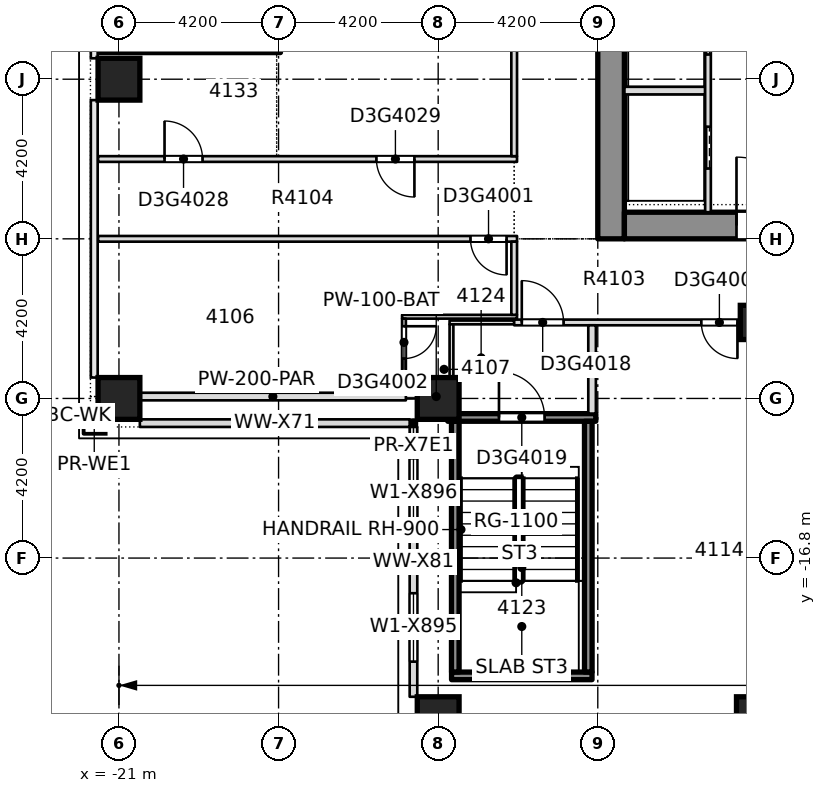
"""IFC4 building model, lengths in metres.
Left out: names, types, materials, properties, quantities, classifications, styles, units other than length and angle.
Written with IfcOpenShell. Run it as: python <this file> out.ifc"""

import sys

from ifc_helpers import new_model, si_unit, direction, frame, frame_2d, origin, origin_2d, place, context, subcontext, project, spatial, rectangle, extrude, element, fill, save


model = new_model("IFC4")
c1 = context("Model", 3, precision=1e-05, world=origin(), true_north=direction((0.0, 1.0)))
c2 = subcontext(c1, "Body", "Model", "MODEL_VIEW")
j1 = project(units=[si_unit("LENGTHUNIT", "METRE"), si_unit("PLANEANGLEUNIT", "RADIAN")], contexts=[c1])
p1 = place(None, origin())
s1 = spatial("IfcSite", under=j1, at=p1, CompositionType="ELEMENT")
p2 = place(p1, origin())
s2 = spatial("IfcBuilding", under=s1, at=p2, CompositionType="ELEMENT")
p3 = place(p2, frame((0.0, 0.0, 160.7)))
s3 = spatial("IfcBuildingStorey", under=s2, at=p3, CompositionType="ELEMENT", Elevation=160.7)
p4 = place(p3, frame((-8.05, -8.4, -0.4), z_axis=(0.0, 0.0, 1.0), x_axis=(0.0, 1.0, 0.0)))
e1 = element("IfcWall", 1, at=p4, inside=s3, PredefinedType="SOLIDWALL", context=c2, shape_type="SweptSolid", body=[
    extrude(rectangle(XDim=30.15, YDim=0.7, at=frame_2d((15.075, 0.0))), origin(), (0.0, 0.0, 1.0), 3.45),
])
p5 = place(p4, frame((19.3, 0.0, 0.4)))
e2 = element("IfcOpeningElement", 2, at=p5, cuts=e1, PredefinedType="OPENING", context=c2, shape_type="SweptSolid", body=[
    extrude(rectangle(XDim=1.2, YDim=2.1, at=frame_2d((0.6, 1.05))), frame((0.0, 0.36, 0.0), z_axis=(0.0, -1.0, 0.0), x_axis=(1.0, 0.0, 0.0)), (0.0, 0.0, 1.0), 0.72),
])
p6 = place(p3, frame((-7.7, -8.05, -0.4), z_axis=(0.0, 0.0, 1.0), x_axis=(1.0, 0.0, 0.0)))
e3 = element("IfcWall", 3, at=p6, inside=s3, PredefinedType="SHEAR", context=c2, shape_type="SweptSolid", body=[
    extrude(rectangle(XDim=15.4, YDim=0.7, at=frame_2d((7.7, 0.0))), origin(), (0.0, 0.0, 1.0), 3.45),
])
p7 = place(p6, frame((2.95, 0.0, 0.4)))
e4 = element("IfcOpeningElement", 4, at=p7, cuts=e3, PredefinedType="OPENING", context=c2, shape_type="SweptSolid", body=[
    extrude(rectangle(XDim=1.8, YDim=2.1, at=frame_2d((0.9, 1.05))), frame((0.0, 0.36, 0.0), z_axis=(0.0, -1.0, 0.0), x_axis=(1.0, 0.0, 0.0)), (0.0, 0.0, 1.0), 0.72),
])
p8 = place(p6, frame((10.65, 0.0, 0.4)))
e5 = element("IfcOpeningElement", 5, at=p8, cuts=e3, PredefinedType="OPENING", context=c2, shape_type="SweptSolid", body=[
    extrude(rectangle(XDim=1.8, YDim=2.1, at=frame_2d((0.9, 1.05))), frame((0.0, 0.36, 0.0), z_axis=(0.0, -1.0, 0.0), x_axis=(1.0, 0.0, 0.0)), (0.0, 0.0, 1.0), 0.72),
])
for number, where, z_axis, x_axis in (
    (6, (-12.6, -21.0, -0.4), (0.0, 0.0, 1.0), (1.0, 0.0, 0.0)),
    (7, (-4.2, -21.0, -0.4), (0.0, 0.0, 1.0), (1.0, 0.0, 0.0)),
    (8, (-21.0, -12.6, -0.4), (0.0, 0.0, 1.0), (1.0, 0.0, 0.0)),
    (9, (-12.6, -12.6, -0.4), (0.0, 0.0, 1.0), (1.0, 0.0, 0.0)),
    (10, (-21.0, -4.2, -0.4), (0.0, 0.0, 1.0), (1.0, 0.0, 0.0)),
):
    element("IfcColumn", number, at=place(p3, frame(where, z_axis=z_axis, x_axis=x_axis)), inside=s3, PredefinedType="COLUMN", context=c2, shape_type="SweptSolid", body=[
        extrude(rectangle(XDim=1.1, YDim=1.1, at=origin_2d()), origin(), (0.0, 0.0, 1.0), 3.45),
    ])
p9 = place(p3, frame((-4.2, -10.6, -0.4), z_axis=(0.0, 0.0, 1.0), x_axis=(1.0, 0.0, 0.0)))
e11 = element("IfcColumn", 11, at=p9, inside=s3, PredefinedType="COLUMN", context=c2, shape_type="SweptSolid", body=[
    extrude(rectangle(XDim=0.9, YDim=0.9, at=origin_2d()), origin(), (0.0, 0.0, 1.0), 3.45),
])
p10 = place(p3, frame((-12.248, -19.9, 0.0), z_axis=(0.0, 0.0, 1.0), x_axis=(1.0, 0.0, 0.0)))
e12 = element("IfcWall", 12, at=p10, inside=s3, PredefinedType="SOLIDWALL", context=c2, shape_type="SweptSolid", body=[
    extrude(rectangle(XDim=3.696, YDim=0.2, at=frame_2d((1.848, 0.0))), origin(), (0.0, 0.0, 1.0), 3.05),
])
p11 = place(p3, frame((-12.348, -13.1, 0.0), z_axis=(0.0, 0.0, 1.0), x_axis=(1.0, 0.0, 0.0)))
e13 = element("IfcWall", 13, at=p11, inside=s3, PredefinedType="SOLIDWALL", context=c2, shape_type="SweptSolid", body=[
    extrude(rectangle(XDim=3.896, YDim=0.2, at=frame_2d((1.948, 0.0))), origin(), (0.0, 0.0, 1.0), 3.05),
])
p12 = place(p11, frame((1.348, 0.0, 0.0)))
e14 = element("IfcOpeningElement", 14, at=p12, cuts=e13, PredefinedType="OPENING", context=c2, shape_type="SweptSolid", body=[
    extrude(rectangle(XDim=1.2, YDim=2.1, at=frame_2d((0.6, 1.05))), frame((0.0, 0.11, 0.0), z_axis=(0.0, -1.0, 0.0), x_axis=(1.0, 0.0, 0.0)), (0.0, 0.0, 1.0), 0.22),
])
p13 = place(p3, frame((-21.55, -12.55, 0.0), z_axis=(0.0, 0.0, 1.0), x_axis=(1.0, 0.0, 0.0)))
e15 = element("IfcWall", 15, at=p13, inside=s3, PredefinedType="PARTITIONING", context=c2, shape_type="SweptSolid", body=[
    extrude(rectangle(XDim=1.1, YDim=0.2, at=frame_2d((0.55, 0.0))), origin(), (0.0, 0.0, 1.0), 3.05),
])
p14 = place(p3, frame((-13.55, -12.55, 0.0), z_axis=(0.0, 0.0, 1.0), x_axis=(1.0, 0.0, 0.0)))
e16 = element("IfcWall", 16, at=p14, inside=s3, PredefinedType="PARTITIONING", context=c2, shape_type="SweptSolid", body=[
    extrude(rectangle(XDim=0.4, YDim=0.1, at=frame_2d((0.2, 0.0))), origin(), (0.0, 0.0, 1.0), 2.5),
])
p15 = place(p3, frame((-12.3, -10.6, 0.0), z_axis=(0.0, 0.0, 1.0), x_axis=(1.0, 0.0, 0.0)))
e17 = element("IfcWall", 17, at=p15, inside=s3, PredefinedType="PARTITIONING", context=c2, shape_type="SweptSolid", body=[
    extrude(rectangle(XDim=1.7, YDim=0.1, at=frame_2d((0.85, 0.0))), origin(), (0.0, 0.0, 1.0), 3.05),
])
p16 = place(p3, frame((-10.6, -10.6, 0.0), z_axis=(0.0, 0.0, 1.0), x_axis=(1.0, 0.0, 0.0)))
e18 = element("IfcWall", 18, at=p16, inside=s3, PredefinedType="PARTITIONING", context=c2, shape_type="SweptSolid", body=[
    extrude(rectangle(XDim=21.25, YDim=0.15, at=frame_2d((10.625, 0.0))), origin(), (0.0, 0.0, 1.0), 3.05),
])
p17 = place(p16, frame((4.925, 0.0, 0.0)))
e19 = element("IfcOpeningElement", 19, at=p17, cuts=e18, PredefinedType="OPENING", context=c2, shape_type="SweptSolid", body=[
    extrude(rectangle(XDim=0.95, YDim=2.1, at=frame_2d((0.475, 1.05))), frame((0.0, 0.085, 0.0), z_axis=(0.0, -1.0, 0.0), x_axis=(1.0, 0.0, 0.0)), (0.0, 0.0, 1.0), 0.17),
])
p18 = place(p16, frame((15.325, 0.0, 0.0)))
e20 = element("IfcOpeningElement", 20, at=p18, cuts=e18, PredefinedType="OPENING", context=c2, shape_type="SweptSolid", body=[
    extrude(rectangle(XDim=0.95, YDim=2.1, at=frame_2d((0.475, 1.05))), frame((0.0, 0.085, 0.0), z_axis=(0.0, -1.0, 0.0), x_axis=(1.0, 0.0, 0.0)), (0.0, 0.0, 1.0), 0.17),
])
p19 = place(p16, frame((0.2, 0.0, 0.0)))
e21 = element("IfcOpeningElement", 21, at=p19, cuts=e18, PredefinedType="OPENING", context=c2, shape_type="SweptSolid", body=[
    extrude(rectangle(XDim=1.1, YDim=2.1, at=frame_2d((0.55, 1.05))), frame((0.0, 0.085, 0.0), z_axis=(0.0, -1.0, 0.0), x_axis=(1.0, 0.0, 0.0)), (0.0, 0.0, 1.0), 0.17),
])
p20 = place(p16, frame((10.05, 0.0, 0.0)))
e22 = element("IfcOpeningElement", 22, at=p20, cuts=e18, PredefinedType="OPENING", context=c2, shape_type="SweptSolid", body=[
    extrude(rectangle(XDim=1.1, YDim=2.1, at=frame_2d((0.55, 1.05))), frame((0.0, 0.085, 0.0), z_axis=(0.0, -1.0, 0.0), x_axis=(1.0, 0.0, 0.0)), (0.0, 0.0, 1.0), 0.17),
])
p21 = place(p16, frame((19.9, 0.0, 0.0)))
e23 = element("IfcOpeningElement", 23, at=p21, cuts=e18, PredefinedType="OPENING", context=c2, shape_type="SweptSolid", body=[
    extrude(rectangle(XDim=1.1, YDim=2.1, at=frame_2d((0.55, 1.05))), frame((0.0, 0.085, 0.0), z_axis=(0.0, -1.0, 0.0), x_axis=(1.0, 0.0, 0.0)), (0.0, 0.0, 1.0), 0.17),
])
p22 = place(p3, frame((-13.55, -10.45, 0.0), z_axis=(0.0, 0.0, 1.0), x_axis=(1.0, 0.0, 0.0)))
e24 = element("IfcWall", 24, at=p22, inside=s3, PredefinedType="PARTITIONING", context=c2, shape_type="SweptSolid", body=[
    extrude(rectangle(XDim=3.025, YDim=0.1, at=frame_2d((1.513, 0.0))), origin(), (0.0, 0.0, 1.0), 3.05),
])
p23 = place(p3, frame((-21.55, -8.4, 0.0), z_axis=(0.0, 0.0, 1.0), x_axis=(1.0, 0.0, 0.0)))
e25 = element("IfcWall", 25, at=p23, inside=s3, PredefinedType="PARTITIONING", context=c2, shape_type="SweptSolid", body=[
    extrude(rectangle(XDim=11.025, YDim=0.15, at=frame_2d((5.513, 0.0))), origin(), (0.0, 0.0, 1.0), 3.05),
])
p24 = place(p23, frame((9.8, 0.0, 0.0)))
e26 = element("IfcOpeningElement", 26, at=p24, cuts=e25, PredefinedType="OPENING", context=c2, shape_type="SweptSolid", body=[
    extrude(rectangle(XDim=0.95, YDim=2.1, at=frame_2d((0.475, 1.05))), frame((0.0, 0.085, 0.0), z_axis=(0.0, -1.0, 0.0), x_axis=(1.0, 0.0, 0.0)), (0.0, 0.0, 1.0), 0.17),
])
p25 = place(p3, frame((-21.55, -6.3, 0.0), z_axis=(0.0, 0.0, 1.0), x_axis=(1.0, 0.0, 0.0)))
e27 = element("IfcWall", 27, at=p25, inside=s3, PredefinedType="PARTITIONING", context=c2, shape_type="SweptSolid", body=[
    extrude(rectangle(XDim=11.025, YDim=0.15, at=frame_2d((5.513, 0.0))), origin(), (0.0, 0.0, 1.0), 3.05),
])
p26 = place(p25, frame((1.75, 0.0, 0.0)))
e28 = element("IfcOpeningElement", 28, at=p26, cuts=e27, PredefinedType="OPENING", context=c2, shape_type="SweptSolid", body=[
    extrude(rectangle(XDim=1.0, YDim=2.1, at=frame_2d((0.5, 1.05))), frame((0.0, 0.085, 0.0), z_axis=(0.0, -1.0, 0.0), x_axis=(1.0, 0.0, 0.0)), (0.0, 0.0, 1.0), 0.17),
])
p27 = place(p25, frame((7.325, 0.0, 0.0)))
e29 = element("IfcOpeningElement", 29, at=p27, cuts=e27, PredefinedType="OPENING", context=c2, shape_type="SweptSolid", body=[
    extrude(rectangle(XDim=1.0, YDim=2.1, at=frame_2d((0.5, 1.05))), frame((0.0, 0.085, 0.0), z_axis=(0.0, -1.0, 0.0), x_axis=(1.0, 0.0, 0.0)), (0.0, 0.0, 1.0), 0.17),
])
p28 = place(p3, frame((-13.5, -12.45, 0.0), z_axis=(0.0, 0.0, 1.0), x_axis=(0.0, 1.0, 0.0)))
e30 = element("IfcWall", 30, at=p28, inside=s3, PredefinedType="PARTITIONING", context=c2, shape_type="SweptSolid", body=[
    extrude(rectangle(XDim=1.95, YDim=0.1, at=frame_2d((0.975, 0.0))), origin(), (0.0, 0.0, 1.0), 3.05),
])
p29 = place(p28, frame((0.9, 0.0, 0.0)))
e31 = element("IfcOpeningElement", 31, at=p29, cuts=e30, PredefinedType="OPENING", context=c2, shape_type="SweptSolid", body=[
    extrude(rectangle(XDim=0.85, YDim=2.1, at=frame_2d((0.425, 1.05))), frame((0.0, 0.06, 0.0), z_axis=(0.0, -1.0, 0.0), x_axis=(1.0, 0.0, 0.0)), (0.0, 0.0, 1.0), 0.12),
])
p30 = place(p3, frame((-12.25, -12.998, 0.0), z_axis=(0.0, 0.0, 1.0), x_axis=(0.0, 1.0, 0.0)))
e32 = element("IfcWall", 32, at=p30, inside=s3, PredefinedType="PARTITIONING", context=c2, shape_type="SweptSolid", body=[
    extrude(rectangle(XDim=0.396, YDim=0.2, at=frame_2d((0.198, 0.0))), origin(), (0.0, 0.0, 1.0), 3.05),
])
p31 = place(p3, frame((-12.25, -12.5, 0.0), z_axis=(0.0, 0.0, 1.0), x_axis=(0.0, 1.0, 0.0)))
e33 = element("IfcWall", 33, at=p31, inside=s3, PredefinedType="PARTITIONING", context=c2, shape_type="SweptSolid", body=[
    extrude(rectangle(XDim=1.85, YDim=0.1, at=frame_2d((0.925, 0.0))), origin(), (0.0, 0.0, 1.0), 3.05),
])
p32 = place(p3, frame((-12.15, -19.798, 0.0), z_axis=(0.0, 0.0, 1.0), x_axis=(0.0, 1.0, 0.0)))
e34 = element("IfcWall", 34, at=p32, inside=s3, PredefinedType="SOLIDWALL", context=c2, shape_type="SweptSolid", body=[
    extrude(rectangle(XDim=6.596, YDim=0.2, at=frame_2d((3.298, 0.0))), origin(), (0.0, 0.0, 1.0), 3.05),
])
p33 = place(p3, frame((-10.6, -10.4, 0.0), z_axis=(0.0, 0.0, 1.0), x_axis=(0.0, 1.0, 0.0)))
e35 = element("IfcWall", 35, at=p33, inside=s3, PredefinedType="PARTITIONING", context=c2, shape_type="SweptSolid", body=[
    extrude(rectangle(XDim=1.925, YDim=0.15, at=frame_2d((0.962, 0.0))), origin(), (0.0, 0.0, 1.0), 3.05),
])
p34 = place(p3, frame((-10.6, -6.225, 0.0), z_axis=(0.0, 0.0, 1.0), x_axis=(0.0, 1.0, 0.0)))
e36 = element("IfcWall", 36, at=p34, inside=s3, PredefinedType="PARTITIONING", context=c2, shape_type="SweptSolid", body=[
    extrude(rectangle(XDim=9.575, YDim=0.15, at=frame_2d((4.788, 0.0))), origin(), (0.0, 0.0, 1.0), 3.05),
])
p35 = place(p34, frame((5.675, 0.0, 0.0)))
e37 = element("IfcOpeningElement", 37, at=p35, cuts=e36, PredefinedType="OPENING", context=c2, shape_type="SweptSolid", body=[
    extrude(rectangle(XDim=1.1, YDim=2.1, at=frame_2d((0.55, 1.05))), frame((0.0, 0.085, 0.0), z_axis=(0.0, -1.0, 0.0), x_axis=(1.0, 0.0, 0.0)), (0.0, 0.0, 1.0), 0.17),
])
p36 = place(p34, frame((7.925, 0.0, 0.0)))
e38 = element("IfcOpeningElement", 38, at=p36, cuts=e36, PredefinedType="OPENING", context=c2, shape_type="SweptSolid", body=[
    extrude(rectangle(XDim=1.0, YDim=2.1, at=frame_2d((0.5, 1.05))), frame((0.0, 0.085, 0.0), z_axis=(0.0, -1.0, 0.0), x_axis=(1.0, 0.0, 0.0)), (0.0, 0.0, 1.0), 0.17),
])
p37 = place(p3, frame((-8.65, -19.798, 0.0), z_axis=(0.0, 0.0, 1.0), x_axis=(0.0, 1.0, 0.0)))
e39 = element("IfcWall", 39, at=p37, inside=s3, PredefinedType="SOLIDWALL", context=c2, shape_type="SweptSolid", body=[
    extrude(rectangle(XDim=6.596, YDim=0.2, at=frame_2d((3.298, 0.0))), origin(), (0.0, 0.0, 1.0), 3.05),
])
p38 = place(p3, frame((-8.55, -12.998, 0.0), z_axis=(0.0, 0.0, 1.0), x_axis=(0.0, 1.0, 0.0)))
e40 = element("IfcWall", 40, at=p38, inside=s3, PredefinedType="PARTITIONING", context=c2, shape_type="SweptSolid", body=[
    extrude(rectangle(XDim=2.323, YDim=0.2, at=frame_2d((1.162, 0.0))), origin(), (0.0, 0.0, 1.0), 3.05),
])
p39 = place(p3, frame((-20.45, -13.25, 0.0), z_axis=(0.0, 0.0, 1.0), x_axis=(1.0, 0.0, 0.0)))
e41 = element("IfcWall", 41, at=p39, inside=s3, PredefinedType="STANDARD", context=c2, shape_type="SweptSolid", body=[
    extrude(rectangle(XDim=7.1, YDim=0.2, at=frame_2d((3.55, 0.0))), origin(), (0.0, 0.0, 1.0), 3.05),
])
p40 = place(p3, frame((-13.25, -13.35, 0.0), z_axis=(0.0, 0.0, 1.0), x_axis=(0.0, -1.0, 0.0)))
e42 = element("IfcWall", 42, at=p40, inside=s3, PredefinedType="STANDARD", context=c2, shape_type="SweptSolid", body=[
    extrude(rectangle(XDim=7.1, YDim=0.2, at=frame_2d((3.55, 0.0))), origin(), (0.0, 0.0, 1.0), 3.05),
])
p41 = place(p40, frame((4.375, 0.0, 0.2)))
e43 = element("IfcOpeningElement", 43, at=p41, cuts=e42, PredefinedType="OPENING", context=c2, shape_type="SweptSolid", body=[
    extrude(rectangle(XDim=1.8, YDim=2.65, at=frame_2d((0.9, 1.325))), frame((0.0, 0.11, 0.0), z_axis=(0.0, -1.0, 0.0), x_axis=(1.0, 0.0, 0.0)), (0.0, 0.0, 1.0), 0.22),
])
p42 = place(p40, frame((0.825, 0.0, 0.2)))
e44 = element("IfcOpeningElement", 44, at=p42, cuts=e42, PredefinedType="OPENING", context=c2, shape_type="SweptSolid", body=[
    extrude(rectangle(XDim=1.8, YDim=2.65, at=frame_2d((0.9, 1.325))), frame((0.0, 0.11, 0.0), z_axis=(0.0, -1.0, 0.0), x_axis=(1.0, 0.0, 0.0)), (0.0, 0.0, 1.0), 0.22),
])
p43 = place(p3, frame((-7.699, -4.5, 0.0), z_axis=(0.0, 0.0, 1.0), x_axis=(1.0, 0.0, 0.0)))
e45 = element("IfcWall", 45, at=p43, inside=s3, PredefinedType="PARTITIONING", context=c2, shape_type="SweptSolid", body=[
    extrude(rectangle(XDim=2.124, YDim=0.2, at=frame_2d((1.062, 0.0))), origin(), (0.0, 0.0, 1.0), 3.05),
])
p44 = place(p3, frame((-5.5, -7.699, 0.0), z_axis=(0.0, 0.0, 1.0), x_axis=(0.0, 1.0, 0.0)))
e46 = element("IfcWall", 46, at=p44, inside=s3, PredefinedType="PARTITIONING", context=c2, shape_type="SweptSolid", body=[
    extrude(rectangle(XDim=12.124, YDim=0.15, at=frame_2d((6.062, 0.0))), origin(), (0.0, 0.0, 1.0), 3.05),
])
p45 = place(p44, frame((1.149, 0.0, 0.0)))
e47 = element("IfcOpeningElement", 47, at=p45, cuts=e46, PredefinedType="OPENING", context=c2, shape_type="SweptSolid", body=[
    extrude(rectangle(XDim=1.1, YDim=2.1, at=frame_2d((0.55, 1.05))), frame((0.0, 0.085, 0.0), z_axis=(0.0, -1.0, 0.0), x_axis=(1.0, 0.0, 0.0)), (0.0, 0.0, 1.0), 0.17),
])
p46 = place(p44, frame((4.149, 0.0, 0.0)))
e48 = element("IfcOpeningElement", 48, at=p46, cuts=e46, PredefinedType="OPENING", context=c2, shape_type="SweptSolid", body=[
    extrude(rectangle(XDim=1.1, YDim=2.1, at=frame_2d((0.55, 1.05))), frame((0.0, 0.085, 0.0), z_axis=(0.0, -1.0, 0.0), x_axis=(1.0, 0.0, 0.0)), (0.0, 0.0, 1.0), 0.17),
])
p47 = place(p44, frame((7.149, 0.0, 0.0)))
e49 = element("IfcOpeningElement", 49, at=p47, cuts=e46, PredefinedType="OPENING", context=c2, shape_type="SweptSolid", body=[
    extrude(rectangle(XDim=1.1, YDim=2.1, at=frame_2d((0.55, 1.05))), frame((0.0, 0.085, 0.0), z_axis=(0.0, -1.0, 0.0), x_axis=(1.0, 0.0, 0.0)), (0.0, 0.0, 1.0), 0.17),
])
p48 = place(p44, frame((10.149, 0.0, 0.0)))
e50 = element("IfcOpeningElement", 50, at=p48, cuts=e46, PredefinedType="OPENING", context=c2, shape_type="SweptSolid", body=[
    extrude(rectangle(XDim=1.1, YDim=2.1, at=frame_2d((0.55, 1.05))), frame((0.0, 0.085, 0.0), z_axis=(0.0, -1.0, 0.0), x_axis=(1.0, 0.0, 0.0)), (0.0, 0.0, 1.0), 0.17),
])
p49 = place(p3, frame((-20.45, -12.55, 0.0), z_axis=(0.0, 0.0, 1.0), x_axis=(1.0, 0.0, 0.0)))
e51 = element("IfcWall", 51, at=p49, inside=s3, PredefinedType="PARTITIONING", context=c2, shape_type="SweptSolid", body=[
    extrude(rectangle(XDim=7.0, YDim=0.2, at=frame_2d((3.5, 0.0))), origin(), (0.0, 0.0, 1.0), 2.5),
])
p50 = place(p3, frame((-13.15, -12.55, 0.0), z_axis=(0.0, 0.0, 1.0), x_axis=(1.0, 0.0, 0.0)))
e52 = element("IfcWall", 52, at=p50, inside=s3, PredefinedType="PARTITIONING", context=c2, shape_type="SweptSolid", body=[
    extrude(rectangle(XDim=0.998, YDim=0.1, at=frame_2d((0.499, 0.0))), origin(), (0.0, 0.0, 1.0), 3.05),
])
p51 = place(p24, origin())
e53 = element("IfcDoor", 53, at=p51, inside=s3, OperationType="SINGLE_SWING_RIGHT", PredefinedType="DOOR", context=c2, shape_type="SweptSolid", body=[
    extrude(rectangle(XDim=0.95, YDim=2.1, at=frame_2d((0.475, 1.05))), frame((0.0, 0.025, 0.0), z_axis=(0.0, -1.0, 0.0), x_axis=(1.0, 0.0, 0.0)), (0.0, 0.0, 1.0), 0.05),
])
fill(e26, e53)
p52 = place(p29, origin())
e54 = element("IfcDoor", 54, at=p52, inside=s3, OperationType="SINGLE_SWING_RIGHT", PredefinedType="DOOR", context=c2, shape_type="SweptSolid", body=[
    extrude(rectangle(XDim=0.85, YDim=2.1, at=frame_2d((0.425, 1.05))), frame((0.0, 0.025, 0.0), z_axis=(0.0, -1.0, 0.0), x_axis=(1.0, 0.0, 0.0)), (0.0, 0.0, 1.0), 0.05),
])
fill(e31, e54)
p53 = place(p17, origin())
e55 = element("IfcDoor", 55, at=p53, inside=s3, OperationType="SINGLE_SWING_LEFT", PredefinedType="DOOR", context=c2, shape_type="SweptSolid", body=[
    extrude(rectangle(XDim=0.95, YDim=2.1, at=frame_2d((0.475, 1.05))), frame((0.0, 0.025, 0.0), z_axis=(0.0, -1.0, 0.0), x_axis=(1.0, 0.0, 0.0)), (0.0, 0.0, 1.0), 0.05),
])
fill(e19, e55)
p54 = place(p19, origin())
e56 = element("IfcDoor", 56, at=p54, inside=s3, OperationType="SINGLE_SWING_RIGHT", PredefinedType="DOOR", context=c2, shape_type="SweptSolid", body=[
    extrude(rectangle(XDim=1.1, YDim=2.1, at=frame_2d((0.55, 1.05))), frame((0.0, 0.025, 0.0), z_axis=(0.0, -1.0, 0.0), x_axis=(1.0, 0.0, 0.0)), (0.0, 0.0, 1.0), 0.05),
])
fill(e21, e56)
p55 = place(p12, origin())
e57 = element("IfcDoor", 57, at=p55, inside=s3, OperationType="SINGLE_SWING_RIGHT", PredefinedType="DOOR", context=c2, shape_type="SweptSolid", body=[
    extrude(rectangle(XDim=1.2, YDim=2.1, at=frame_2d((0.6, 1.05))), frame((0.0, 0.025, 0.0), z_axis=(0.0, -1.0, 0.0), x_axis=(1.0, 0.0, 0.0)), (0.0, 0.0, 1.0), 0.05),
])
fill(e14, e57)
p56 = place(p26, origin())
e58 = element("IfcDoor", 58, at=p56, inside=s3, OperationType="SINGLE_SWING_RIGHT", PredefinedType="DOOR", context=c2, shape_type="SweptSolid", body=[
    extrude(rectangle(XDim=1.0, YDim=2.1, at=frame_2d((0.5, 1.05))), frame((0.0, 0.025, 0.0), z_axis=(0.0, -1.0, 0.0), x_axis=(1.0, 0.0, 0.0)), (0.0, 0.0, 1.0), 0.05),
])
fill(e28, e58)
p57 = place(p27, origin())
e59 = element("IfcDoor", 59, at=p57, inside=s3, OperationType="SINGLE_SWING_LEFT", PredefinedType="DOOR", context=c2, shape_type="SweptSolid", body=[
    extrude(rectangle(XDim=1.0, YDim=2.1, at=frame_2d((0.5, 1.05))), frame((0.0, 0.025, 0.0), z_axis=(0.0, -1.0, 0.0), x_axis=(1.0, 0.0, 0.0)), (0.0, 0.0, 1.0), 0.05),
])
fill(e29, e59)
p58 = place(p41, origin())
e60 = element("IfcWindow", 60, at=p58, inside=s3, PartitioningType="SINGLE_PANEL", PredefinedType="WINDOW", context=c2, shape_type="SweptSolid", body=[
    extrude(rectangle(XDim=1.8, YDim=2.65, at=frame_2d((0.9, 1.325))), frame((0.0, 0.03, 0.0), z_axis=(0.0, -1.0, 0.0), x_axis=(1.0, 0.0, 0.0)), (0.0, 0.0, 1.0), 0.06),
])
fill(e43, e60)
p59 = place(p42, origin())
e61 = element("IfcWindow", 61, at=p59, inside=s3, PartitioningType="SINGLE_PANEL", PredefinedType="WINDOW", context=c2, shape_type="SweptSolid", body=[
    extrude(rectangle(XDim=1.8, YDim=2.65, at=frame_2d((0.9, 1.325))), frame((0.0, 0.03, 0.0), z_axis=(0.0, -1.0, 0.0), x_axis=(1.0, 0.0, 0.0)), (0.0, 0.0, 1.0), 0.06),
])
fill(e44, e61)
p60 = place(p45, origin())
e62 = element("IfcDoor", 62, at=p60, inside=s3, OperationType="SLIDING_TO_LEFT", PredefinedType="DOOR", context=c2, shape_type="SweptSolid", body=[
    extrude(rectangle(XDim=1.1, YDim=2.1, at=frame_2d((0.55, 1.05))), frame((0.0, 0.025, 0.0), z_axis=(0.0, -1.0, 0.0), x_axis=(1.0, 0.0, 0.0)), (0.0, 0.0, 1.0), 0.05),
])
fill(e47, e62)
p61 = place(p46, origin())
e63 = element("IfcDoor", 63, at=p61, inside=s3, OperationType="SLIDING_TO_LEFT", PredefinedType="DOOR", context=c2, shape_type="SweptSolid", body=[
    extrude(rectangle(XDim=1.1, YDim=2.1, at=frame_2d((0.55, 1.05))), frame((0.0, 0.025, 0.0), z_axis=(0.0, -1.0, 0.0), x_axis=(1.0, 0.0, 0.0)), (0.0, 0.0, 1.0), 0.05),
])
fill(e48, e63)
p62 = place(p7, origin())
e64 = element("IfcDoor", 64, at=p62, inside=s3, OperationType="SINGLE_SWING_LEFT", PredefinedType="DOOR", context=c2, shape_type="SweptSolid", body=[
    extrude(rectangle(XDim=1.8, YDim=2.1, at=frame_2d((0.9, 1.05))), frame((0.0, 0.025, 0.0), z_axis=(0.0, -1.0, 0.0), x_axis=(1.0, 0.0, 0.0)), (0.0, 0.0, 1.0), 0.05),
])
fill(e4, e64)
save(model, sys.argv[1])
